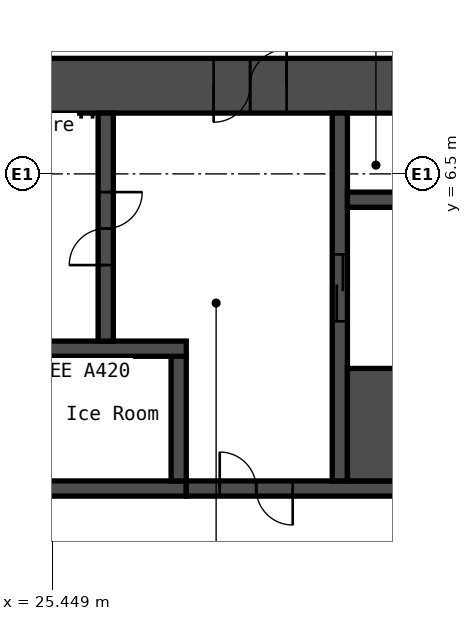
"""IFC4 building model, lengths in metres.
Left out: names, types, materials, properties, quantities, classifications, styles, units other than length and angle.
Written with IfcOpenShell. Run it as: python <this file> out.ifc"""

import sys

from ifc_helpers import new_model, si_unit, direction, frame, frame_2d, origin, place, context, subcontext, project, spatial, rectangle, extrude, element, fill, save


model = new_model("IFC4")
c1 = context("Model", 3, precision=1e-05, world=origin(), true_north=direction((0.0, 1.0)))
c2 = subcontext(c1, "Body", "Model", "MODEL_VIEW")
j1 = project(units=[si_unit("LENGTHUNIT", "METRE"), si_unit("PLANEANGLEUNIT", "RADIAN")], contexts=[c1])
p1 = place(None, origin())
s1 = spatial("IfcSite", under=j1, at=p1, CompositionType="ELEMENT")
p2 = place(p1, origin())
s2 = spatial("IfcBuilding", under=s1, at=p2, CompositionType="ELEMENT")
p3 = place(p2, frame((0.0, 0.0, 131.0)))
s3 = spatial("IfcBuildingStorey", under=s2, at=p3, CompositionType="ELEMENT", Elevation=131.0)
p4 = place(p3, frame((17.7, 7.95, 0.0), z_axis=(0.0, 0.0, 1.0), x_axis=(1.0, 0.0, 0.0)))
e1 = element("IfcWall", 1, at=p4, inside=s3, PredefinedType="SHEAR", context=c2, shape_type="SweptSolid", body=[
    extrude(rectangle(XDim=15.0, YDim=0.9, at=frame_2d((7.5, 0.0))), origin(), (0.0, 0.0, 1.0), 2.75),
])
p5 = place(p4, frame((10.4, 0.0, 0.0)))
e2 = element("IfcOpeningElement", 2, at=p5, cuts=e1, PredefinedType="OPENING", context=c2, shape_type="SweptSolid", body=[
    extrude(rectangle(XDim=1.2, YDim=2.1, at=frame_2d((0.6, 1.05))), frame((0.0, 0.46, 0.0), z_axis=(0.0, -1.0, 0.0), x_axis=(1.0, 0.0, 0.0)), (0.0, 0.0, 1.0), 0.92),
])
p6 = place(p4, frame((13.35, 0.0, 0.0)))
e3 = element("IfcOpeningElement", 3, at=p6, cuts=e1, PredefinedType="OPENING", context=c2, shape_type="SweptSolid", body=[
    extrude(rectangle(XDim=0.9, YDim=2.1, at=frame_2d((0.45, 1.05))), frame((0.0, 0.46, 0.0), z_axis=(0.0, -1.0, 0.0), x_axis=(1.0, 0.0, 0.0)), (0.0, 0.0, 1.0), 0.92),
])
p7 = place(p3, frame((20.15, 1.325, 0.0), z_axis=(0.0, 0.0, 1.0), x_axis=(1.0, 0.0, 0.0)))
e4 = element("IfcWall", 4, at=p7, inside=s3, PredefinedType="SHEAR", context=c2, shape_type="SweptSolid", body=[
    extrude(rectangle(XDim=7.5, YDim=0.25, at=frame_2d((3.75, 0.0))), origin(), (0.0, 0.0, 1.0), 2.75),
])
p8 = place(p7, frame((0.587, 0.0, 0.0)))
e5 = element("IfcOpeningElement", 5, at=p8, cuts=e4, PredefinedType="OPENING", context=c2, shape_type="SweptSolid", body=[
    extrude(rectangle(XDim=0.9, YDim=2.1, at=frame_2d((0.45, 1.05))), frame((0.0, 0.135, 0.0), z_axis=(0.0, -1.0, 0.0), x_axis=(1.0, 0.0, 0.0)), (0.0, 0.0, 1.0), 0.27),
])
p9 = place(p7, frame((4.288, 0.0, 0.0)))
e6 = element("IfcOpeningElement", 6, at=p9, cuts=e4, PredefinedType="OPENING", context=c2, shape_type="SweptSolid", body=[
    extrude(rectangle(XDim=0.9, YDim=2.1, at=frame_2d((0.45, 1.05))), frame((0.0, 0.135, 0.0), z_axis=(0.0, -1.0, 0.0), x_axis=(1.0, 0.0, 0.0)), (0.0, 0.0, 1.0), 0.27),
])
p10 = place(p3, frame((27.525, 1.45, 0.0), z_axis=(0.0, 0.0, 1.0), x_axis=(0.0, 1.0, 0.0)))
e7 = element("IfcWall", 7, at=p10, inside=s3, PredefinedType="SHEAR", context=c2, shape_type="SweptSolid", body=[
    extrude(rectangle(XDim=2.05, YDim=0.25, at=frame_2d((1.025, 0.0))), origin(), (0.0, 0.0, 1.0), 2.75),
])
p11 = place(p3, frame((20.15, 3.625, 0.0), z_axis=(0.0, 0.0, 1.0), x_axis=(1.0, 0.0, 0.0)))
e8 = element("IfcWall", 8, at=p11, inside=s3, PredefinedType="SHEAR", context=c2, shape_type="SweptSolid", body=[
    extrude(rectangle(XDim=7.5, YDim=0.25, at=frame_2d((3.75, 0.0))), origin(), (0.0, 0.0, 1.0), 2.75),
])
p12 = place(p3, frame((26.325, 3.75, 0.0), z_axis=(0.0, 0.0, 1.0), x_axis=(0.0, 1.0, 0.0)))
e9 = element("IfcWall", 9, at=p12, inside=s3, PredefinedType="SHEAR", context=c2, shape_type="SweptSolid", body=[
    extrude(rectangle(XDim=3.75, YDim=0.25, at=frame_2d((1.875, 0.0))), origin(), (0.0, 0.0, 1.0), 2.75),
])
p13 = place(p12, frame((1.25, 0.0, 0.0)))
e10 = element("IfcOpeningElement", 10, at=p13, cuts=e9, PredefinedType="OPENING", context=c2, shape_type="SweptSolid", body=[
    extrude(rectangle(XDim=1.2, YDim=2.1, at=frame_2d((0.6, 1.05))), frame((0.0, 0.135, 0.0), z_axis=(0.0, -1.0, 0.0), x_axis=(1.0, 0.0, 0.0)), (0.0, 0.0, 1.0), 0.27),
])
p14 = place(p3, frame((27.65, 1.325, 0.0), z_axis=(0.0, 0.0, 1.0), x_axis=(1.0, 0.0, 0.0)))
e11 = element("IfcWall", 11, at=p14, inside=s3, PredefinedType="SHEAR", context=c2, shape_type="SweptSolid", body=[
    extrude(rectangle(XDim=5.05, YDim=0.25, at=frame_2d((2.525, 0.0))), origin(), (0.0, 0.0, 1.0), 2.75),
])
p15 = place(p14, frame((0.55, 0.0, 0.0)))
e12 = element("IfcOpeningElement", 12, at=p15, cuts=e11, PredefinedType="OPENING", context=c2, shape_type="SweptSolid", body=[
    extrude(rectangle(XDim=1.2, YDim=2.1, at=frame_2d((0.6, 1.05))), frame((0.0, 0.135, 0.0), z_axis=(0.0, -1.0, 0.0), x_axis=(1.0, 0.0, 0.0)), (0.0, 0.0, 1.0), 0.27),
])
p16 = place(p3, frame((30.175, 1.45, 0.0), z_axis=(0.0, 0.0, 1.0), x_axis=(0.0, 1.0, 0.0)))
e13 = element("IfcWall", 13, at=p16, inside=s3, PredefinedType="SHEAR", context=c2, shape_type="SweptSolid", body=[
    extrude(rectangle(XDim=6.05, YDim=0.25, at=frame_2d((3.025, 0.0))), origin(), (0.0, 0.0, 1.0), 2.75),
])
p17 = place(p16, frame((2.625, 0.0, 0.0)))
e14 = element("IfcOpeningElement", 14, at=p17, cuts=e13, PredefinedType="OPENING", context=c2, shape_type="SweptSolid", body=[
    extrude(rectangle(XDim=1.1, YDim=2.1, at=frame_2d((0.55, 1.05))), frame((0.0, 0.135, 0.0), z_axis=(0.0, -1.0, 0.0), x_axis=(1.0, 0.0, 0.0)), (0.0, 0.0, 1.0), 0.27),
])
p18 = place(p3, frame((30.3, 2.375, 0.0), z_axis=(0.0, 0.0, 1.0), x_axis=(1.0, 0.0, 0.0)))
e15 = element("IfcWall", 15, at=p18, inside=s3, PredefinedType="SHEAR", context=c2, shape_type="SweptSolid", body=[
    extrude(rectangle(XDim=2.4, YDim=1.85, at=frame_2d((1.2, 0.0))), origin(), (0.0, 0.0, 1.0), 2.75),
])
p19 = place(p3, frame((30.3, 6.075, 0.0), z_axis=(0.0, 0.0, 1.0), x_axis=(1.0, 0.0, 0.0)))
e16 = element("IfcWall", 16, at=p19, inside=s3, PredefinedType="SHEAR", context=c2, shape_type="SweptSolid", body=[
    extrude(rectangle(XDim=2.4, YDim=0.25, at=frame_2d((1.2, 0.0))), origin(), (0.0, 0.0, 1.0), 2.75),
])
p20 = place(p5, origin())
e17 = element("IfcDoor", 17, at=p20, inside=s3, OperationType="DOUBLE_DOOR_SINGLE_SWING", PredefinedType="DOOR", context=c2, shape_type="SweptSolid", body=[
    extrude(rectangle(XDim=1.2, YDim=2.1, at=frame_2d((0.6, 1.05))), frame((0.0, 0.025, 0.0), z_axis=(0.0, -1.0, 0.0), x_axis=(1.0, 0.0, 0.0)), (0.0, 0.0, 1.0), 0.05),
])
fill(e2, e17)
p21 = place(p13, origin())
e18 = element("IfcDoor", 18, at=p21, inside=s3, OperationType="DOUBLE_DOOR_SINGLE_SWING", PredefinedType="DOOR", context=c2, shape_type="SweptSolid", body=[
    extrude(rectangle(XDim=1.2, YDim=2.1, at=frame_2d((0.6, 1.05))), frame((0.0, 0.025, 0.0), z_axis=(0.0, -1.0, 0.0), x_axis=(1.0, 0.0, 0.0)), (0.0, 0.0, 1.0), 0.05),
])
fill(e10, e18)
p22 = place(p15, origin())
e19 = element("IfcDoor", 19, at=p22, inside=s3, OperationType="DOUBLE_DOOR_SINGLE_SWING", PredefinedType="DOOR", context=c2, shape_type="SweptSolid", body=[
    extrude(rectangle(XDim=1.2, YDim=2.1, at=frame_2d((0.6, 1.05))), frame((0.0, 0.025, 0.0), z_axis=(0.0, -1.0, 0.0), x_axis=(1.0, 0.0, 0.0)), (0.0, 0.0, 1.0), 0.05),
])
fill(e12, e19)
p23 = place(p17, origin())
e20 = element("IfcDoor", 20, at=p23, inside=s3, OperationType="DOUBLE_DOOR_SLIDING", PredefinedType="DOOR", context=c2, shape_type="SweptSolid", body=[
    extrude(rectangle(XDim=1.1, YDim=2.1, at=frame_2d((0.55, 1.05))), frame((0.0, 0.025, 0.0), z_axis=(0.0, -1.0, 0.0), x_axis=(1.0, 0.0, 0.0)), (0.0, 0.0, 1.0), 0.05),
])
fill(e14, e20)
save(model, sys.argv[1])
